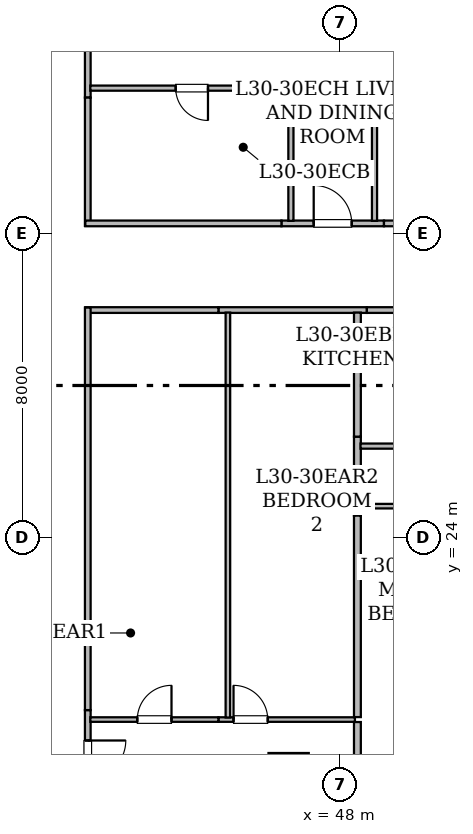
"""IFC4 building model, lengths in metres.
Left out: names, types, materials, properties, quantities, classifications, styles, units other than length and angle.
Written with IfcOpenShell. Run it as: python <this file> out.ifc"""

import sys

from ifc_helpers import new_model, si_unit, direction, frame, frame_2d, origin, origin_2d, place, context, subcontext, project, spatial, rectangle, hollow_rectangle, extrude, element, fill, save


model = new_model("IFC4")
c1 = context("Model", 3, precision=1e-05, world=origin(), true_north=direction((0.0, 1.0)))
c2 = subcontext(c1, "Body", "Model", "MODEL_VIEW")
j1 = project(units=[si_unit("LENGTHUNIT", "METRE"), si_unit("PLANEANGLEUNIT", "RADIAN")], contexts=[c1])
p1 = place(None, origin())
s1 = spatial("IfcSite", under=j1, at=p1, CompositionType="ELEMENT")
p2 = place(p1, origin())
s2 = spatial("IfcBuilding", under=s1, at=p2, CompositionType="ELEMENT")
p3 = place(p2, frame((0.0, 0.0, 120.15)))
s3 = spatial("IfcBuildingStorey", under=s2, at=p3, CompositionType="ELEMENT", Elevation=120.15)
p4 = place(p3, frame((46.65, 17.8, 0.0), z_axis=(0.0, 0.0, 1.0), x_axis=(1.0, 0.0, 0.0)))
e1 = element("IfcColumn", 1, at=p4, inside=s3, PredefinedType="COLUMN", context=c2, shape_type="SweptSolid", body=[
    extrude(hollow_rectangle(XDim=1.0, YDim=1.0, WallThickness=0.05, at=origin_2d()), origin(), (0.0, 0.0, 1.0), 3.65),
])
p5 = place(p3, frame((41.365, 19.459, 0.0), z_axis=(0.0, 0.0, 1.0), x_axis=(0.0, -1.0, 0.0)))
e2 = element("IfcWall", 2, at=p5, inside=s3, PredefinedType="STANDARD", context=c2, shape_type="SweptSolid", body=[
    extrude(rectangle(XDim=2.559, YDim=0.15, at=frame_2d((1.28, 0.0))), origin(), (0.0, 0.0, 1.0), 2.647),
])
p6 = place(p5, frame((0.8, 0.0, 0.0)))
e3 = element("IfcOpeningElement", 3, at=p6, cuts=e2, PredefinedType="OPENING", context=c2, shape_type="SweptSolid", body=[
    extrude(rectangle(XDim=1.0, YDim=2.15, at=frame_2d((0.5, 1.075))), frame((0.0, 0.085, 0.0), z_axis=(0.0, -1.0, 0.0), x_axis=(1.0, 0.0, 0.0)), (0.0, 0.0, 1.0), 0.17),
])
p7 = place(p3, frame((48.709, 29.985, 0.0), z_axis=(0.0, 0.0, 1.0), x_axis=(-1.0, 0.0, 0.0)))
e4 = element("IfcWall", 4, at=p7, inside=s3, PredefinedType="STANDARD", context=c2, shape_type="SweptSolid", body=[
    extrude(rectangle(XDim=3.906, YDim=0.15, at=frame_2d((1.953, 0.0))), origin(), (0.0, 0.0, 1.0), 2.647),
])
p8 = place(p3, frame((44.803, 29.985, 0.0), z_axis=(0.0, 0.0, 1.0), x_axis=(-1.0, 0.0, 0.0)))
e5 = element("IfcWall", 5, at=p8, inside=s3, PredefinedType="STANDARD", context=c2, shape_type="SweptSolid", body=[
    extrude(rectangle(XDim=3.503, YDim=0.15, at=frame_2d((1.751, 0.0))), origin(), (0.0, 0.0, 1.0), 3.43),
])
p9 = place(p3, frame((41.365, 30.05, 0.0), z_axis=(0.0, 0.0, 1.0), x_axis=(0.0, -1.0, 0.0)))
e6 = element("IfcWall", 6, at=p9, inside=s3, PredefinedType="STANDARD", context=c2, shape_type="SweptSolid", body=[
    extrude(rectangle(XDim=10.591, YDim=0.15, at=frame_2d((5.295, 0.0))), origin(), (0.0, 0.0, 1.0), 3.013),
])
p10 = place(p3, frame((50.665, 29.985, 0.0), z_axis=(0.0, 0.0, 1.0), x_axis=(-1.0, 0.0, 0.0)))
e7 = element("IfcWall", 7, at=p10, inside=s3, PredefinedType="STANDARD", context=c2, shape_type="SweptSolid", body=[
    extrude(rectangle(XDim=1.956, YDim=0.15, at=frame_2d((0.978, 0.0))), origin(), (0.0, 0.0, 1.0), 3.43),
])
p11 = place(p3, frame((41.365, 37.653, 0.0), z_axis=(0.0, 0.0, 1.0), x_axis=(0.0, -1.0, 0.0)))
e8 = element("IfcWall", 8, at=p11, inside=s3, PredefinedType="STANDARD", context=c2, shape_type="SweptSolid", body=[
    extrude(rectangle(XDim=2.078, YDim=0.15, at=frame_2d((1.039, 0.0))), origin(), (0.0, 0.0, 1.0), 2.647),
])
p12 = place(p3, frame((46.461, 32.265, 0.0), z_axis=(0.0, 0.0, 1.0), x_axis=(1.0, 0.0, 0.0)))
e9 = element("IfcWall", 9, at=p12, inside=s3, PredefinedType="STANDARD", context=c2, shape_type="SweptSolid", body=[
    extrude(rectangle(XDim=2.698, YDim=0.15, at=frame_2d((1.349, 0.0))), origin(), (0.0, 0.0, 1.0), 2.647),
])
p13 = place(p12, frame((0.849, 0.0, 0.0)))
e10 = element("IfcOpeningElement", 10, at=p13, cuts=e9, PredefinedType="OPENING", context=c2, shape_type="SweptSolid", body=[
    extrude(rectangle(XDim=1.0, YDim=2.15, at=frame_2d((0.5, 1.075))), frame((0.0, 0.085, 0.0), z_axis=(0.0, -1.0, 0.0), x_axis=(1.0, 0.0, 0.0)), (0.0, 0.0, 1.0), 0.17),
])
p14 = place(p3, frame((41.365, 35.575, 0.0), z_axis=(0.0, 0.0, 1.0), x_axis=(0.0, -1.0, 0.0)))
e11 = element("IfcWall", 11, at=p14, inside=s3, PredefinedType="STANDARD", context=c2, shape_type="SweptSolid", body=[
    extrude(rectangle(XDim=3.375, YDim=0.15, at=frame_2d((1.688, 0.0))), origin(), (0.0, 0.0, 1.0), 3.43),
])
p15 = place(p3, frame((41.3, 32.265, 0.0), z_axis=(0.0, 0.0, 1.0), x_axis=(1.0, 0.0, 0.0)))
e12 = element("IfcWall", 12, at=p15, inside=s3, PredefinedType="STANDARD", context=c2, shape_type="SweptSolid", body=[
    extrude(rectangle(XDim=5.161, YDim=0.15, at=frame_2d((2.581, 0.0))), origin(), (0.0, 0.0, 1.0), 2.647),
])
p16 = place(p3, frame((49.159, 32.265, 0.0), z_axis=(0.0, 0.0, 1.0), x_axis=(1.0, 0.0, 0.0)))
e13 = element("IfcWall", 13, at=p16, inside=s3, PredefinedType="STANDARD", context=c2, shape_type="SweptSolid", body=[
    extrude(rectangle(XDim=7.229, YDim=0.15, at=frame_2d((3.615, 0.0))), origin(), (0.0, 0.0, 1.0), 2.876),
])
p17 = place(p3, frame((44.803, 19.21, 0.0), z_axis=(0.0, 0.0, 1.0), x_axis=(1.0, 0.0, 0.0)))
e14 = element("IfcWall", 14, at=p17, inside=s3, PredefinedType="PARTITIONING", context=c2, shape_type="SweptSolid", body=[
    extrude(rectangle(XDim=3.592, YDim=0.12, at=frame_2d((1.796, 0.0))), origin(), (0.0, 0.0, 1.0), 2.647),
])
p18 = place(p17, frame((0.397, 0.0, 0.0)))
e15 = element("IfcOpeningElement", 15, at=p18, cuts=e14, PredefinedType="OPENING", context=c2, shape_type="SweptSolid", body=[
    extrude(rectangle(XDim=0.9, YDim=2.1, at=frame_2d((0.45, 1.05))), frame((0.0, 0.07, 0.0), z_axis=(0.0, -1.0, 0.0), x_axis=(1.0, 0.0, 0.0)), (0.0, 0.0, 1.0), 0.14),
])
p19 = place(p3, frame((41.432, 19.21, 0.0), z_axis=(0.0, 0.0, 1.0), x_axis=(1.0, 0.0, 0.0)))
e16 = element("IfcWall", 16, at=p19, inside=s3, PredefinedType="PARTITIONING", context=c2, shape_type="SweptSolid", body=[
    extrude(rectangle(XDim=3.371, YDim=0.12, at=frame_2d((1.686, 0.0))), origin(), (0.0, 0.0, 1.0), 3.43),
])
p20 = place(p19, frame((1.236, 0.0, 0.0)))
e17 = element("IfcOpeningElement", 17, at=p20, cuts=e16, PredefinedType="OPENING", context=c2, shape_type="SweptSolid", body=[
    extrude(rectangle(XDim=0.9, YDim=2.1, at=frame_2d((0.45, 1.05))), frame((0.0, 0.07, 0.0), z_axis=(0.0, -1.0, 0.0), x_axis=(1.0, 0.0, 0.0)), (0.0, 0.0, 1.0), 0.14),
])
p21 = place(p3, frame((48.46, 19.145, 0.0), z_axis=(0.0, 0.0, 1.0), x_axis=(0.0, -1.0, 0.0)))
e18 = element("IfcWall", 18, at=p21, inside=s3, PredefinedType="STANDARD", context=c2, shape_type="SweptSolid", body=[
    extrude(rectangle(XDim=3.908, YDim=0.18, at=frame_2d((1.954, 0.0))), origin(), (0.0, 0.0, 1.0), 2.687),
])
p22 = place(p3, frame((45.052, 19.264, 0.0), z_axis=(0.0, 0.0, 1.0), x_axis=(0.0, 1.0, 0.0)))
e19 = element("IfcWall", 19, at=p22, inside=s3, PredefinedType="PARTITIONING", context=c2, shape_type="SweptSolid", body=[
    extrude(rectangle(XDim=10.654, YDim=0.12, at=frame_2d((5.327, 0.0))), origin(), (0.0, 0.0, 1.0), 3.013),
])
p23 = place(p3, frame((48.46, 26.654, 0.0), z_axis=(0.0, 0.0, 1.0), x_axis=(0.0, -1.0, 0.0)))
e20 = element("IfcWall", 20, at=p23, inside=s3, PredefinedType="STANDARD", context=c2, shape_type="SweptSolid", body=[
    extrude(rectangle(XDim=2.078, YDim=0.18, at=frame_2d((1.039, 0.0))), origin(), (0.0, 0.0, 1.0), 3.43),
])
p24 = place(p3, frame((48.46, 29.918, 0.0), z_axis=(0.0, 0.0, 1.0), x_axis=(0.0, -1.0, 0.0)))
e21 = element("IfcWall", 21, at=p24, inside=s3, PredefinedType="STANDARD", context=c2, shape_type="SweptSolid", body=[
    extrude(rectangle(XDim=3.264, YDim=0.18, at=frame_2d((1.632, 0.0))), origin(), (0.0, 0.0, 1.0), 3.43),
])
p25 = place(p3, frame((48.46, 24.576, 0.0), z_axis=(0.0, 0.0, 1.0), x_axis=(0.0, -1.0, 0.0)))
e22 = element("IfcWall", 22, at=p25, inside=s3, PredefinedType="STANDARD", context=c2, shape_type="SweptSolid", body=[
    extrude(rectangle(XDim=5.301, YDim=0.18, at=frame_2d((2.65, 0.0))), origin(), (0.0, 0.0, 1.0), 2.687),
])
p26 = place(p3, frame((48.542, 26.405, 0.0), z_axis=(0.0, 0.0, 1.0), x_axis=(1.0, 0.0, 0.0)))
e23 = element("IfcWall", 23, at=p26, inside=s3, PredefinedType="PARTITIONING", context=c2, shape_type="SweptSolid", body=[
    extrude(rectangle(XDim=1.907, YDim=0.135, at=frame_2d((0.954, 0.0))), origin(), (0.0, 0.0, 1.0), 3.43),
])
p27 = place(p3, frame((51.788, 24.825, 0.0), z_axis=(0.0, 0.0, 1.0), x_axis=(-1.0, 0.0, 0.0)))
e24 = element("IfcWall", 24, at=p27, inside=s3, PredefinedType="PARTITIONING", context=c2, shape_type="SweptSolid", body=[
    extrude(rectangle(XDim=3.246, YDim=0.12, at=frame_2d((1.623, 0.0))), origin(), (0.0, 0.0, 1.0), 3.43),
])
p28 = place(p3, frame((46.71, 32.332, 0.0), z_axis=(0.0, 0.0, 1.0), x_axis=(0.0, 1.0, 0.0)))
e25 = element("IfcWall", 25, at=p28, inside=s3, PredefinedType="PARTITIONING", context=c2, shape_type="SweptSolid", body=[
    extrude(rectangle(XDim=3.557, YDim=0.135, at=frame_2d((1.778, 0.0))), origin(), (0.0, 0.0, 1.0), 2.647),
])
p29 = place(p3, frame((46.775, 35.824, 0.0), z_axis=(0.0, 0.0, 1.0), x_axis=(-1.0, 0.0, 0.0)))
e26 = element("IfcWall", 26, at=p29, inside=s3, PredefinedType="PARTITIONING", context=c2, shape_type="SweptSolid", body=[
    extrude(rectangle(XDim=5.343, YDim=0.135, at=frame_2d((2.671, 0.0))), origin(), (0.0, 0.0, 1.0), 2.647),
])
p30 = place(p29, frame((2.247, 0.0, 0.0)))
e27 = element("IfcOpeningElement", 27, at=p30, cuts=e26, PredefinedType="OPENING", context=c2, shape_type="SweptSolid", body=[
    extrude(rectangle(XDim=0.85, YDim=2.1, at=frame_2d((0.425, 1.05))), frame((0.0, 0.077, 0.0), z_axis=(0.0, -1.0, 0.0), x_axis=(1.0, 0.0, 0.0)), (0.0, 0.0, 1.0), 0.155),
])
p31 = place(p3, frame((56.388, 35.824, 0.0), z_axis=(0.0, 0.0, 1.0), x_axis=(-1.0, 0.0, 0.0)))
e28 = element("IfcWall", 28, at=p31, inside=s3, PredefinedType="PARTITIONING", context=c2, shape_type="SweptSolid", body=[
    extrude(rectangle(XDim=7.543, YDim=0.135, at=frame_2d((3.771, 0.0))), origin(), (0.0, 0.0, 1.0), 2.876),
])
p32 = place(p31, frame((3.347, 0.0, 0.0)))
e29 = element("IfcOpeningElement", 29, at=p32, cuts=e28, PredefinedType="OPENING", context=c2, shape_type="SweptSolid", body=[
    extrude(rectangle(XDim=0.85, YDim=2.1, at=frame_2d((0.425, 1.05))), frame((0.0, 0.077, 0.0), z_axis=(0.0, -1.0, 0.0), x_axis=(1.0, 0.0, 0.0)), (0.0, 0.0, 1.0), 0.155),
])
p33 = place(p3, frame((48.91, 35.889, 0.0), z_axis=(0.0, 0.0, 1.0), x_axis=(0.0, -1.0, 0.0)))
e30 = element("IfcWall", 30, at=p33, inside=s3, PredefinedType="PARTITIONING", context=c2, shape_type="SweptSolid", body=[
    extrude(rectangle(XDim=3.557, YDim=0.135, at=frame_2d((1.778, 0.0))), origin(), (0.0, 0.0, 1.0), 3.43),
])
p34 = place(p6, origin())
e31 = element("IfcDoor", 31, at=p34, inside=s3, OperationType="SINGLE_SWING_LEFT", PredefinedType="DOOR", context=c2, shape_type="SweptSolid", body=[
    extrude(rectangle(XDim=1.0, YDim=2.15, at=frame_2d((0.5, 1.075))), frame((0.0, 0.025, 0.0), z_axis=(0.0, -1.0, 0.0), x_axis=(1.0, 0.0, 0.0)), (0.0, 0.0, 1.0), 0.05),
])
fill(e3, e31)
p35 = place(p13, origin())
e32 = element("IfcDoor", 32, at=p35, inside=s3, OperationType="SINGLE_SWING_LEFT", PredefinedType="DOOR", context=c2, shape_type="SweptSolid", body=[
    extrude(rectangle(XDim=1.0, YDim=2.15, at=frame_2d((0.5, 1.075))), frame((0.0, 0.025, 0.0), z_axis=(0.0, -1.0, 0.0), x_axis=(1.0, 0.0, 0.0)), (0.0, 0.0, 1.0), 0.05),
])
fill(e10, e32)
p36 = place(p18, origin())
e33 = element("IfcDoor", 33, at=p36, inside=s3, OperationType="SINGLE_SWING_LEFT", PredefinedType="DOOR", context=c2, shape_type="SweptSolid", body=[
    extrude(rectangle(XDim=0.9, YDim=2.1, at=frame_2d((0.45, 1.05))), frame((0.0, 0.025, 0.0), z_axis=(0.0, -1.0, 0.0), x_axis=(1.0, 0.0, 0.0)), (0.0, 0.0, 1.0), 0.05),
])
fill(e15, e33)
p37 = place(p20, origin())
e34 = element("IfcDoor", 34, at=p37, inside=s3, OperationType="SINGLE_SWING_RIGHT", PredefinedType="DOOR", context=c2, shape_type="SweptSolid", body=[
    extrude(rectangle(XDim=0.9, YDim=2.1, at=frame_2d((0.45, 1.05))), frame((0.0, 0.025, 0.0), z_axis=(0.0, -1.0, 0.0), x_axis=(1.0, 0.0, 0.0)), (0.0, 0.0, 1.0), 0.05),
])
fill(e17, e34)
p38 = place(p30, origin())
e35 = element("IfcDoor", 35, at=p38, inside=s3, OperationType="SINGLE_SWING_LEFT", PredefinedType="DOOR", context=c2, shape_type="SweptSolid", body=[
    extrude(rectangle(XDim=0.85, YDim=2.1, at=frame_2d((0.425, 1.05))), frame((0.0, 0.025, 0.0), z_axis=(0.0, -1.0, 0.0), x_axis=(1.0, 0.0, 0.0)), (0.0, 0.0, 1.0), 0.05),
])
fill(e27, e35)
save(model, sys.argv[1])
